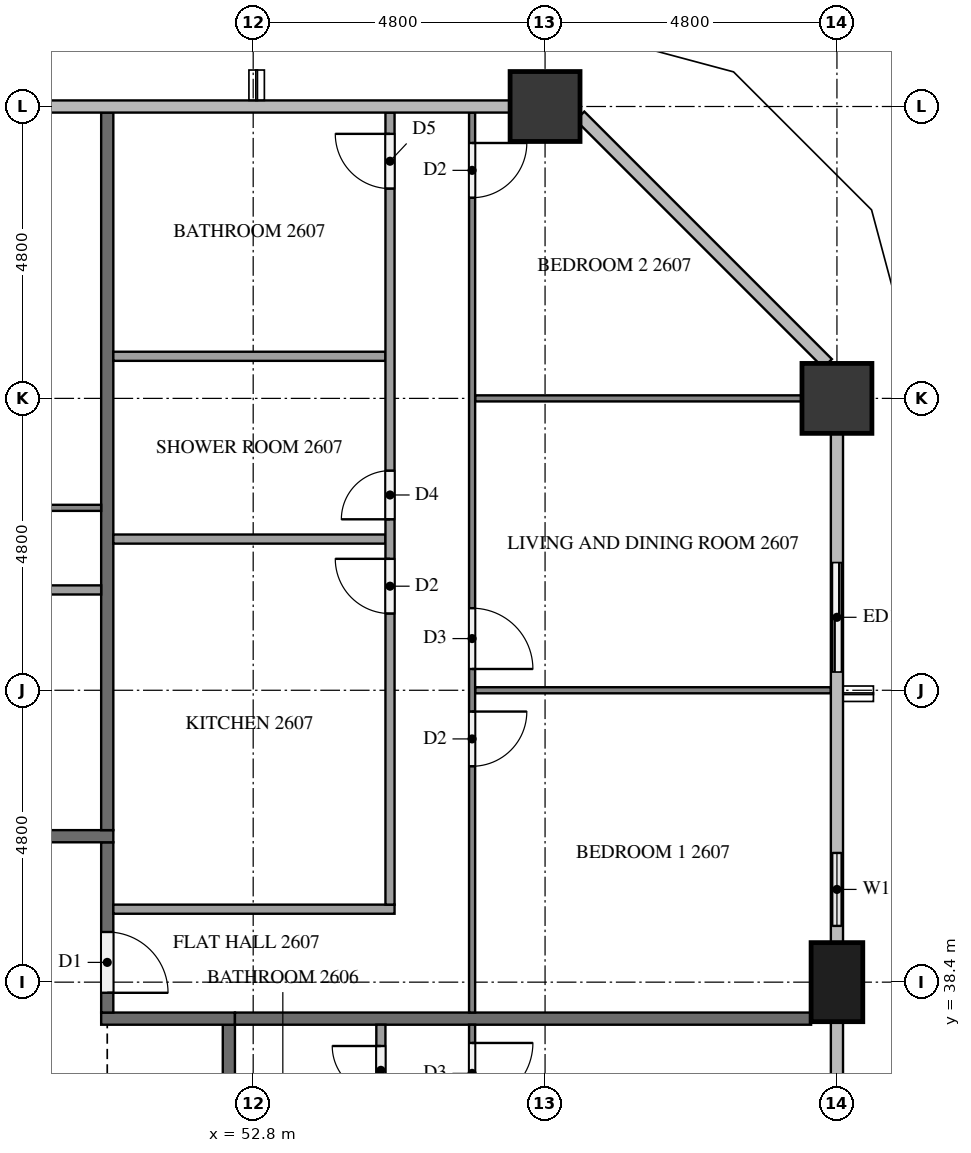
"""IFC4 building model, lengths in metres.
Left out: names, types, materials, properties, quantities, classifications, styles, units other than length and angle.
Written with IfcOpenShell. Run it as: python <this file> out.ifc"""

import sys

from ifc_helpers import new_model, si_unit, direction, frame, frame_2d, origin, origin_2d, place, context, subcontext, project, spatial, rectangle, extrude, element, fill, save


model = new_model("IFC4")
c1 = context("Model", 3, precision=1e-05, world=origin(), true_north=direction((0.0, 1.0)))
c2 = subcontext(c1, "Body", "Model", "MODEL_VIEW")
j1 = project(units=[si_unit("LENGTHUNIT", "METRE"), si_unit("PLANEANGLEUNIT", "RADIAN")], contexts=[c1])
p1 = place(None, origin())
s1 = spatial("IfcSite", under=j1, at=p1, CompositionType="ELEMENT")
p2 = place(p1, origin())
s2 = spatial("IfcBuilding", under=s1, at=p2, CompositionType="ELEMENT")
p3 = place(p2, frame((0.0, 0.0, 103.2)))
s3 = spatial("IfcBuildingStorey", under=s2, at=p3, CompositionType="ELEMENT", Elevation=103.2)
p4 = place(p3, frame((62.4, 38.4, 0.0), z_axis=(0.0, 0.0, 1.0), x_axis=(0.0, 1.0, 0.0)))
e1 = element("IfcColumn", 1, at=p4, inside=s3, PredefinedType="COLUMN", context=c2, shape_type="SweptSolid", body=[
    extrude(rectangle(XDim=1.3, YDim=0.85, at=origin_2d()), origin(), (0.0, 0.0, 1.0), 3.2),
])
for number, where, z_axis, x_axis in (
    (2, (62.4, 48.0, 0.0), (0.0, 0.0, 1.0), (1.0, 0.0, 0.0)),
    (3, (57.6, 52.8, 0.0), (0.0, 0.0, 1.0), (1.0, 0.0, 0.0)),
):
    element("IfcColumn", number, at=place(p3, frame(where, z_axis=z_axis, x_axis=x_axis)), inside=s3, PredefinedType="COLUMN", context=c2, shape_type="SweptSolid", body=[
        extrude(rectangle(XDim=1.15, YDim=1.15, at=origin_2d()), origin(), (0.0, 0.0, 1.0), 3.2),
    ])
p5 = place(p3, frame((62.4, 39.05, 0.0), z_axis=(0.0, 0.0, 1.0), x_axis=(0.0, 1.0, 0.0)))
e4 = element("IfcWall", 4, at=p5, inside=s3, PredefinedType="SOLIDWALL", context=c2, shape_type="SweptSolid", body=[
    extrude(rectangle(XDim=1.75, YDim=0.15, at=frame_2d((0.875, 0.0))), origin(), (0.0, 0.0, 1.0), 3.2),
])
p6 = place(p5, frame((0.275, 0.0, 0.9)))
e5 = element("IfcOpeningElement", 5, at=p6, cuts=e4, PredefinedType="OPENING", context=c2, shape_type="SweptSolid", body=[
    extrude(rectangle(XDim=1.2, YDim=1.4, at=frame_2d((0.6, 0.7))), frame((0.0, 0.085, 0.0), z_axis=(0.0, -1.0, 0.0), x_axis=(1.0, 0.0, 0.0)), (0.0, 0.0, 1.0), 0.17),
])
p7 = place(p3, frame((62.4, 43.2, 0.0), z_axis=(0.0, 0.0, 1.0), x_axis=(0.0, 1.0, 0.0)))
e6 = element("IfcWall", 6, at=p7, inside=s3, PredefinedType="SOLIDWALL", context=c2, shape_type="SweptSolid", body=[
    extrude(rectangle(XDim=2.4, YDim=0.15, at=frame_2d((1.2, 0.0))), origin(), (0.0, 0.0, 1.0), 3.2),
])
p8 = place(p7, frame((0.3, 0.0, 0.0)))
e7 = element("IfcOpeningElement", 7, at=p8, cuts=e6, PredefinedType="OPENING", context=c2, shape_type="SweptSolid", body=[
    extrude(rectangle(XDim=1.8, YDim=2.4, at=frame_2d((0.9, 1.2))), frame((0.0, 0.085, 0.0), z_axis=(0.0, -1.0, 0.0), x_axis=(1.0, 0.0, 0.0)), (0.0, 0.0, 1.0), 0.17),
])
p9 = place(p3, frame((52.4, 37.7, 0.0), z_axis=(0.0, 0.0, 1.0), x_axis=(0.0, -1.0, 0.0)))
e8 = element("IfcWall", 8, at=p9, inside=s3, PredefinedType="PARTITIONING", context=c2, shape_type="SweptSolid", body=[
    extrude(rectangle(XDim=22.6, YDim=0.2, at=frame_2d((11.3, 0.0))), origin(), (0.0, 0.0, 1.0), 3.2),
])
p10 = place(p9, frame((6.925, 0.0, 0.0)))
e9 = element("IfcOpeningElement", 9, at=p10, cuts=e8, PredefinedType="OPENING", context=c2, shape_type="SweptSolid", body=[
    extrude(rectangle(XDim=1.0, YDim=2.1, at=frame_2d((0.5, 1.05))), frame((0.0, 0.11, 0.0), z_axis=(0.0, -1.0, 0.0), x_axis=(1.0, 0.0, 0.0)), (0.0, 0.0, 1.0), 0.22),
])
p11 = place(p9, frame((5.075, 0.0, 0.0)))
e10 = element("IfcOpeningElement", 10, at=p11, cuts=e8, PredefinedType="OPENING", context=c2, shape_type="SweptSolid", body=[
    extrude(rectangle(XDim=1.0, YDim=2.1, at=frame_2d((0.5, 1.05))), frame((0.0, 0.11, 0.0), z_axis=(0.0, -1.0, 0.0), x_axis=(1.0, 0.0, 0.0)), (0.0, 0.0, 1.0), 0.22),
])
p12 = place(p3, frame((52.5, 37.8, 0.0), z_axis=(0.0, 0.0, 1.0), x_axis=(-1.0, 0.0, 0.0)))
e11 = element("IfcWall", 11, at=p12, inside=s3, PredefinedType="PARTITIONING", context=c2, shape_type="SweptSolid", body=[
    extrude(rectangle(XDim=2.2, YDim=0.2, at=frame_2d((1.1, 0.0))), origin(), (0.0, 0.0, 1.0), 3.2),
])
p13 = place(p3, frame((50.4, 40.7, 0.0), z_axis=(0.0, 0.0, 1.0), x_axis=(0.0, -1.0, 0.0)))
e12 = element("IfcWall", 12, at=p13, inside=s3, PredefinedType="PARTITIONING", context=c2, shape_type="SweptSolid", body=[
    extrude(rectangle(XDim=2.8, YDim=0.2, at=frame_2d((1.4, 0.0))), origin(), (0.0, 0.0, 1.0), 3.2),
])
p14 = place(p13, frame((1.475, 0.0, 0.0)))
e13 = element("IfcOpeningElement", 13, at=p14, cuts=e12, PredefinedType="OPENING", context=c2, shape_type="SweptSolid", body=[
    extrude(rectangle(XDim=1.0, YDim=2.1, at=frame_2d((0.5, 1.05))), frame((0.0, 0.11, 0.0), z_axis=(0.0, -1.0, 0.0), x_axis=(1.0, 0.0, 0.0)), (0.0, 0.0, 1.0), 0.22),
])
p15 = place(p3, frame((11.9, 40.8, 0.0), z_axis=(0.0, 0.0, 1.0), x_axis=(1.0, 0.0, 0.0)))
e14 = element("IfcWall", 14, at=p15, inside=s3, PredefinedType="PARTITIONING", context=c2, shape_type="SweptSolid", body=[
    extrude(rectangle(XDim=38.6, YDim=0.2, at=frame_2d((19.3, 0.0))), origin(), (0.0, 0.0, 1.0), 3.2),
])
p16 = place(p15, frame((22.125, 0.0, 0.0)))
e15 = element("IfcOpeningElement", 15, at=p16, cuts=e14, PredefinedType="OPENING", context=c2, shape_type="SweptSolid", body=[
    extrude(rectangle(XDim=1.0, YDim=2.1, at=frame_2d((0.5, 1.05))), frame((0.0, 0.11, 0.0), z_axis=(0.0, -1.0, 0.0), x_axis=(1.0, 0.0, 0.0)), (0.0, 0.0, 1.0), 0.22),
])
p17 = place(p15, frame((20.275, 0.0, 0.0)))
e16 = element("IfcOpeningElement", 16, at=p17, cuts=e14, PredefinedType="OPENING", context=c2, shape_type="SweptSolid", body=[
    extrude(rectangle(XDim=1.0, YDim=2.1, at=frame_2d((0.5, 1.05))), frame((0.0, 0.11, 0.0), z_axis=(0.0, -1.0, 0.0), x_axis=(1.0, 0.0, 0.0)), (0.0, 0.0, 1.0), 0.22),
])
p18 = place(p15, frame((0.525, 0.0, 0.0)))
e17 = element("IfcOpeningElement", 17, at=p18, cuts=e14, PredefinedType="OPENING", context=c2, shape_type="SweptSolid", body=[
    extrude(rectangle(XDim=1.0, YDim=2.1, at=frame_2d((0.5, 1.05))), frame((0.0, 0.11, 0.0), z_axis=(0.0, -1.0, 0.0), x_axis=(1.0, 0.0, 0.0)), (0.0, 0.0, 1.0), 0.22),
])
p19 = place(p3, frame((52.5, 37.8, 0.0), z_axis=(0.0, 0.0, 1.0), x_axis=(1.0, 0.0, 0.0)))
e18 = element("IfcWall", 18, at=p19, inside=s3, PredefinedType="PARTITIONING", context=c2, shape_type="SweptSolid", body=[
    extrude(rectangle(XDim=9.475, YDim=0.2, at=frame_2d((4.738, 0.0))), origin(), (0.0, 0.0, 1.0), 3.2),
])
p20 = place(p3, frame((50.4, 40.9, 0.0), z_axis=(0.0, 0.0, 1.0), x_axis=(0.0, 1.0, 0.0)))
e19 = element("IfcWall", 19, at=p20, inside=s3, PredefinedType="PARTITIONING", context=c2, shape_type="SweptSolid", body=[
    extrude(rectangle(XDim=11.8, YDim=0.2, at=frame_2d((5.9, 0.0))), origin(), (0.0, 0.0, 1.0), 3.2),
])
p21 = place(p3, frame((56.4, 37.7, 0.0), z_axis=(0.0, 0.0, 1.0), x_axis=(0.0, -1.0, 0.0)))
e20 = element("IfcWall", 20, at=p21, inside=s3, PredefinedType="PARTITIONING", context=c2, shape_type="SweptSolid", body=[
    extrude(rectangle(XDim=6.4, YDim=0.1, at=frame_2d((3.2, 0.0))), origin(), (0.0, 0.0, 1.0), 3.2),
])
p22 = place(p21, frame((0.3, 0.0, 0.0)))
e21 = element("IfcOpeningElement", 21, at=p22, cuts=e20, PredefinedType="OPENING", context=c2, shape_type="SweptSolid", body=[
    extrude(rectangle(XDim=1.0, YDim=2.1, at=frame_2d((0.5, 1.05))), frame((0.0, 0.06, 0.0), z_axis=(0.0, -1.0, 0.0), x_axis=(1.0, 0.0, 0.0)), (0.0, 0.0, 1.0), 0.12),
])
p23 = place(p3, frame((54.9, 33.075, 0.0), z_axis=(0.0, 0.0, 1.0), x_axis=(0.0, 1.0, 0.0)))
e22 = element("IfcWall", 22, at=p23, inside=s3, PredefinedType="PARTITIONING", context=c2, shape_type="SweptSolid", body=[
    extrude(rectangle(XDim=4.625, YDim=0.15, at=frame_2d((2.312, 0.0))), origin(), (0.0, 0.0, 1.0), 3.2),
])
p24 = place(p23, frame((0.3, 0.0, 0.0)))
e23 = element("IfcOpeningElement", 23, at=p24, cuts=e22, PredefinedType="OPENING", context=c2, shape_type="SweptSolid", body=[
    extrude(rectangle(XDim=0.9, YDim=2.1, at=frame_2d((0.45, 1.05))), frame((0.0, 0.085, 0.0), z_axis=(0.0, -1.0, 0.0), x_axis=(1.0, 0.0, 0.0)), (0.0, 0.0, 1.0), 0.17),
])
p25 = place(p23, frame((3.475, 0.0, 0.0)))
e24 = element("IfcOpeningElement", 24, at=p25, cuts=e22, PredefinedType="OPENING", context=c2, shape_type="SweptSolid", body=[
    extrude(rectangle(XDim=0.8, YDim=2.1, at=frame_2d((0.4, 1.05))), frame((0.0, 0.085, 0.0), z_axis=(0.0, -1.0, 0.0), x_axis=(1.0, 0.0, 0.0)), (0.0, 0.0, 1.0), 0.17),
])
p26 = place(p3, frame((56.45, 43.2, 0.0), z_axis=(0.0, 0.0, 1.0), x_axis=(1.0, 0.0, 0.0)))
e25 = element("IfcWall", 25, at=p26, inside=s3, PredefinedType="PARTITIONING", context=c2, shape_type="SweptSolid", body=[
    extrude(rectangle(XDim=5.85, YDim=0.1, at=frame_2d((2.925, 0.0))), origin(), (0.0, 0.0, 1.0), 3.2),
])
p27 = place(p3, frame((56.45, 48.0, 0.0), z_axis=(0.0, 0.0, 1.0), x_axis=(1.0, 0.0, 0.0)))
e26 = element("IfcWall", 26, at=p27, inside=s3, PredefinedType="PARTITIONING", context=c2, shape_type="SweptSolid", body=[
    extrude(rectangle(XDim=5.375, YDim=0.1, at=frame_2d((2.688, 0.0))), origin(), (0.0, 0.0, 1.0), 3.2),
])
p28 = place(p3, frame((56.4, 52.7, 0.0), z_axis=(0.0, 0.0, 1.0), x_axis=(0.0, -1.0, 0.0)))
e27 = element("IfcWall", 27, at=p28, inside=s3, PredefinedType="PARTITIONING", context=c2, shape_type="SweptSolid", body=[
    extrude(rectangle(XDim=14.8, YDim=0.1, at=frame_2d((7.4, 0.0))), origin(), (0.0, 0.0, 1.0), 3.2),
])
p29 = place(p28, frame((9.85, 0.0, 0.0)))
e28 = element("IfcOpeningElement", 28, at=p29, cuts=e27, PredefinedType="OPENING", context=c2, shape_type="SweptSolid", body=[
    extrude(rectangle(XDim=0.9, YDim=2.1, at=frame_2d((0.45, 1.05))), frame((0.0, 0.06, 0.0), z_axis=(0.0, -1.0, 0.0), x_axis=(1.0, 0.0, 0.0)), (0.0, 0.0, 1.0), 0.12),
])
p30 = place(p28, frame((8.15, 0.0, 0.0)))
e29 = element("IfcOpeningElement", 29, at=p30, cuts=e27, PredefinedType="OPENING", context=c2, shape_type="SweptSolid", body=[
    extrude(rectangle(XDim=1.0, YDim=2.1, at=frame_2d((0.5, 1.05))), frame((0.0, 0.06, 0.0), z_axis=(0.0, -1.0, 0.0), x_axis=(1.0, 0.0, 0.0)), (0.0, 0.0, 1.0), 0.12),
])
p31 = place(p28, frame((0.5, 0.0, 0.0)))
e30 = element("IfcOpeningElement", 30, at=p31, cuts=e27, PredefinedType="OPENING", context=c2, shape_type="SweptSolid", body=[
    extrude(rectangle(XDim=0.9, YDim=2.1, at=frame_2d((0.45, 1.05))), frame((0.0, 0.06, 0.0), z_axis=(0.0, -1.0, 0.0), x_axis=(1.0, 0.0, 0.0)), (0.0, 0.0, 1.0), 0.12),
])
for number, where, z_axis, x_axis in (
    (31, (50.5, 45.687, 0.0), (0.0, 0.0, 1.0), (1.0, 0.0, 0.0)),
    (32, (50.5, 48.692, 0.0), (0.0, 0.0, 1.0), (1.0, 0.0, 0.0)),
):
    element("IfcWall", number, at=place(p3, frame(where, z_axis=z_axis, x_axis=x_axis)), inside=s3, PredefinedType="PARTITIONING", context=c2, shape_type="SweptSolid", body=[
        extrude(rectangle(XDim=4.475, YDim=0.15, at=frame_2d((2.238, 0.0))), origin(), (0.0, 0.0, 1.0), 3.2),
    ])
p32 = place(p3, frame((50.5, 39.6, 0.0), z_axis=(0.0, 0.0, 1.0), x_axis=(1.0, 0.0, 0.0)))
e33 = element("IfcWall", 33, at=p32, inside=s3, PredefinedType="PARTITIONING", context=c2, shape_type="SweptSolid", body=[
    extrude(rectangle(XDim=4.625, YDim=0.15, at=frame_2d((2.312, 0.0))), origin(), (0.0, 0.0, 1.0), 3.2),
])
p33 = place(p3, frame((55.05, 39.675, 0.0), z_axis=(0.0, 0.0, 1.0), x_axis=(0.0, 1.0, 0.0)))
e34 = element("IfcWall", 34, at=p33, inside=s3, PredefinedType="PARTITIONING", context=c2, shape_type="SweptSolid", body=[
    extrude(rectangle(XDim=13.025, YDim=0.15, at=frame_2d((6.512, 0.0))), origin(), (0.0, 0.0, 1.0), 3.2),
])
p34 = place(p33, frame((4.787, 0.0, 0.0)))
e35 = element("IfcOpeningElement", 35, at=p34, cuts=e34, PredefinedType="OPENING", context=c2, shape_type="SweptSolid", body=[
    extrude(rectangle(XDim=0.9, YDim=2.1, at=frame_2d((0.45, 1.05))), frame((0.0, 0.085, 0.0), z_axis=(0.0, -1.0, 0.0), x_axis=(1.0, 0.0, 0.0)), (0.0, 0.0, 1.0), 0.17),
])
p35 = place(p33, frame((6.336, 0.0, 0.0)))
e36 = element("IfcOpeningElement", 36, at=p35, cuts=e34, PredefinedType="OPENING", context=c2, shape_type="SweptSolid", body=[
    extrude(rectangle(XDim=0.8, YDim=2.1, at=frame_2d((0.4, 1.05))), frame((0.0, 0.085, 0.0), z_axis=(0.0, -1.0, 0.0), x_axis=(1.0, 0.0, 0.0)), (0.0, 0.0, 1.0), 0.17),
])
p36 = place(p33, frame((11.775, 0.0, 0.0)))
e37 = element("IfcOpeningElement", 37, at=p36, cuts=e34, PredefinedType="OPENING", context=c2, shape_type="SweptSolid", body=[
    extrude(rectangle(XDim=0.9, YDim=2.1, at=frame_2d((0.45, 1.05))), frame((0.0, 0.085, 0.0), z_axis=(0.0, -1.0, 0.0), x_axis=(1.0, 0.0, 0.0)), (0.0, 0.0, 1.0), 0.17),
])
p37 = place(p3, frame((33.7, 46.2, 0.0), z_axis=(0.0, 0.0, 1.0), x_axis=(1.0, 0.0, 0.0)))
e38 = element("IfcWall", 38, at=p37, inside=s3, PredefinedType="PARTITIONING", context=c2, shape_type="SweptSolid", body=[
    extrude(rectangle(XDim=16.6, YDim=0.1, at=frame_2d((8.3, 0.0))), origin(), (0.0, 0.0, 1.0), 3.2),
])
p38 = place(p37, frame((0.3, 0.0, 0.0)))
e39 = element("IfcOpeningElement", 39, at=p38, cuts=e38, PredefinedType="OPENING", context=c2, shape_type="SweptSolid", body=[
    extrude(rectangle(XDim=0.9, YDim=2.1, at=frame_2d((0.45, 1.05))), frame((0.0, 0.06, 0.0), z_axis=(0.0, -1.0, 0.0), x_axis=(1.0, 0.0, 0.0)), (0.0, 0.0, 1.0), 0.12),
])
p39 = place(p37, frame((10.55, 0.0, 0.0)))
e40 = element("IfcOpeningElement", 40, at=p39, cuts=e38, PredefinedType="OPENING", context=c2, shape_type="SweptSolid", body=[
    extrude(rectangle(XDim=1.0, YDim=2.1, at=frame_2d((0.5, 1.05))), frame((0.0, 0.06, 0.0), z_axis=(0.0, -1.0, 0.0), x_axis=(1.0, 0.0, 0.0)), (0.0, 0.0, 1.0), 0.12),
])
p40 = place(p37, frame((12.25, 0.0, 0.0)))
e41 = element("IfcOpeningElement", 41, at=p40, cuts=e38, PredefinedType="OPENING", context=c2, shape_type="SweptSolid", body=[
    extrude(rectangle(XDim=0.9, YDim=2.1, at=frame_2d((0.45, 1.05))), frame((0.0, 0.06, 0.0), z_axis=(0.0, -1.0, 0.0), x_axis=(1.0, 0.0, 0.0)), (0.0, 0.0, 1.0), 0.12),
])
p41 = place(p3, frame((50.3, 44.85, 0.0), z_axis=(0.0, 0.0, 1.0), x_axis=(-1.0, 0.0, 0.0)))
e42 = element("IfcWall", 42, at=p41, inside=s3, PredefinedType="PARTITIONING", context=c2, shape_type="SweptSolid", body=[
    extrude(rectangle(XDim=14.825, YDim=0.15, at=frame_2d((7.413, 0.0))), origin(), (0.0, 0.0, 1.0), 3.2),
])
p42 = place(p41, frame((13.625, 0.0, 0.0)))
e43 = element("IfcOpeningElement", 43, at=p42, cuts=e42, PredefinedType="OPENING", context=c2, shape_type="SweptSolid", body=[
    extrude(rectangle(XDim=0.9, YDim=2.1, at=frame_2d((0.45, 1.05))), frame((0.0, 0.085, 0.0), z_axis=(0.0, -1.0, 0.0), x_axis=(1.0, 0.0, 0.0)), (0.0, 0.0, 1.0), 0.17),
])
p43 = place(p41, frame((4.886, 0.0, 0.0)))
e44 = element("IfcOpeningElement", 44, at=p43, cuts=e42, PredefinedType="OPENING", context=c2, shape_type="SweptSolid", body=[
    extrude(rectangle(XDim=0.8, YDim=2.1, at=frame_2d((0.4, 1.05))), frame((0.0, 0.085, 0.0), z_axis=(0.0, -1.0, 0.0), x_axis=(1.0, 0.0, 0.0)), (0.0, 0.0, 1.0), 0.17),
])
p44 = place(p41, frame((3.336, 0.0, 0.0)))
e45 = element("IfcOpeningElement", 45, at=p44, cuts=e42, PredefinedType="OPENING", context=c2, shape_type="SweptSolid", body=[
    extrude(rectangle(XDim=0.9, YDim=2.1, at=frame_2d((0.45, 1.05))), frame((0.0, 0.085, 0.0), z_axis=(0.0, -1.0, 0.0), x_axis=(1.0, 0.0, 0.0)), (0.0, 0.0, 1.0), 0.17),
])
p45 = place(p6, origin())
e46 = element("IfcWindow", 46, at=p45, inside=s3, PartitioningType="SINGLE_PANEL", PredefinedType="WINDOW", context=c2, shape_type="SweptSolid", body=[
    extrude(rectangle(XDim=1.2, YDim=1.4, at=frame_2d((0.6, 0.7))), frame((0.0, 0.03, 0.0), z_axis=(0.0, -1.0, 0.0), x_axis=(1.0, 0.0, 0.0)), (0.0, 0.0, 1.0), 0.06),
])
fill(e5, e46)
p46 = place(p8, origin())
e47 = element("IfcDoor", 47, at=p46, inside=s3, OperationType="SLIDING_TO_LEFT", PredefinedType="DOOR", context=c2, shape_type="SweptSolid", body=[
    extrude(rectangle(XDim=1.8, YDim=2.4, at=frame_2d((0.9, 1.2))), frame((0.0, 0.025, 0.0), z_axis=(0.0, -1.0, 0.0), x_axis=(1.0, 0.0, 0.0)), (0.0, 0.0, 1.0), 0.05),
])
fill(e7, e47)
p47 = place(p14, origin())
e48 = element("IfcDoor", 48, at=p47, inside=s3, OperationType="SINGLE_SWING_RIGHT", PredefinedType="DOOR", context=c2, shape_type="SweptSolid", body=[
    extrude(rectangle(XDim=1.0, YDim=2.1, at=frame_2d((0.5, 1.05))), frame((0.0, 0.025, 0.0), z_axis=(0.0, -1.0, 0.0), x_axis=(1.0, 0.0, 0.0)), (0.0, 0.0, 1.0), 0.05),
])
fill(e13, e48)
p48 = place(p22, origin())
e49 = element("IfcDoor", 49, at=p48, inside=s3, OperationType="SINGLE_SWING_LEFT", PredefinedType="DOOR", context=c2, shape_type="SweptSolid", body=[
    extrude(rectangle(XDim=1.0, YDim=2.1, at=frame_2d((0.5, 1.05))), frame((0.0, 0.025, 0.0), z_axis=(0.0, -1.0, 0.0), x_axis=(1.0, 0.0, 0.0)), (0.0, 0.0, 1.0), 0.05),
])
fill(e21, e49)
p49 = place(p25, origin())
e50 = element("IfcDoor", 50, at=p49, inside=s3, OperationType="SINGLE_SWING_RIGHT", PredefinedType="DOOR", context=c2, shape_type="SweptSolid", body=[
    extrude(rectangle(XDim=0.8, YDim=2.1, at=frame_2d((0.4, 1.05))), frame((0.0, 0.025, 0.0), z_axis=(0.0, -1.0, 0.0), x_axis=(1.0, 0.0, 0.0)), (0.0, 0.0, 1.0), 0.05),
])
fill(e24, e50)
p50 = place(p29, origin())
e51 = element("IfcDoor", 51, at=p50, inside=s3, OperationType="SINGLE_SWING_LEFT", PredefinedType="DOOR", context=c2, shape_type="SweptSolid", body=[
    extrude(rectangle(XDim=0.9, YDim=2.1, at=frame_2d((0.45, 1.05))), frame((0.0, 0.025, 0.0), z_axis=(0.0, -1.0, 0.0), x_axis=(1.0, 0.0, 0.0)), (0.0, 0.0, 1.0), 0.05),
])
fill(e28, e51)
p51 = place(p30, origin())
e52 = element("IfcDoor", 52, at=p51, inside=s3, OperationType="SINGLE_SWING_RIGHT", PredefinedType="DOOR", context=c2, shape_type="SweptSolid", body=[
    extrude(rectangle(XDim=1.0, YDim=2.1, at=frame_2d((0.5, 1.05))), frame((0.0, 0.025, 0.0), z_axis=(0.0, -1.0, 0.0), x_axis=(1.0, 0.0, 0.0)), (0.0, 0.0, 1.0), 0.05),
])
fill(e29, e52)
p52 = place(p31, origin())
e53 = element("IfcDoor", 53, at=p52, inside=s3, OperationType="SINGLE_SWING_LEFT", PredefinedType="DOOR", context=c2, shape_type="SweptSolid", body=[
    extrude(rectangle(XDim=0.9, YDim=2.1, at=frame_2d((0.45, 1.05))), frame((0.0, 0.025, 0.0), z_axis=(0.0, -1.0, 0.0), x_axis=(1.0, 0.0, 0.0)), (0.0, 0.0, 1.0), 0.05),
])
fill(e30, e53)
p53 = place(p34, origin())
e54 = element("IfcDoor", 54, at=p53, inside=s3, OperationType="SINGLE_SWING_RIGHT", PredefinedType="DOOR", context=c2, shape_type="SweptSolid", body=[
    extrude(rectangle(XDim=0.9, YDim=2.1, at=frame_2d((0.45, 1.05))), frame((0.0, 0.025, 0.0), z_axis=(0.0, -1.0, 0.0), x_axis=(1.0, 0.0, 0.0)), (0.0, 0.0, 1.0), 0.05),
])
fill(e35, e54)
p54 = place(p35, origin())
e55 = element("IfcDoor", 55, at=p54, inside=s3, OperationType="SINGLE_SWING_LEFT", PredefinedType="DOOR", context=c2, shape_type="SweptSolid", body=[
    extrude(rectangle(XDim=0.8, YDim=2.1, at=frame_2d((0.4, 1.05))), frame((0.0, 0.025, 0.0), z_axis=(0.0, -1.0, 0.0), x_axis=(1.0, 0.0, 0.0)), (0.0, 0.0, 1.0), 0.05),
])
fill(e36, e55)
p55 = place(p36, origin())
e56 = element("IfcDoor", 56, at=p55, inside=s3, OperationType="SINGLE_SWING_RIGHT", PredefinedType="DOOR", context=c2, shape_type="SweptSolid", body=[
    extrude(rectangle(XDim=0.9, YDim=2.1, at=frame_2d((0.45, 1.05))), frame((0.0, 0.025, 0.0), z_axis=(0.0, -1.0, 0.0), x_axis=(1.0, 0.0, 0.0)), (0.0, 0.0, 1.0), 0.05),
])
fill(e37, e56)
save(model, sys.argv[1])
